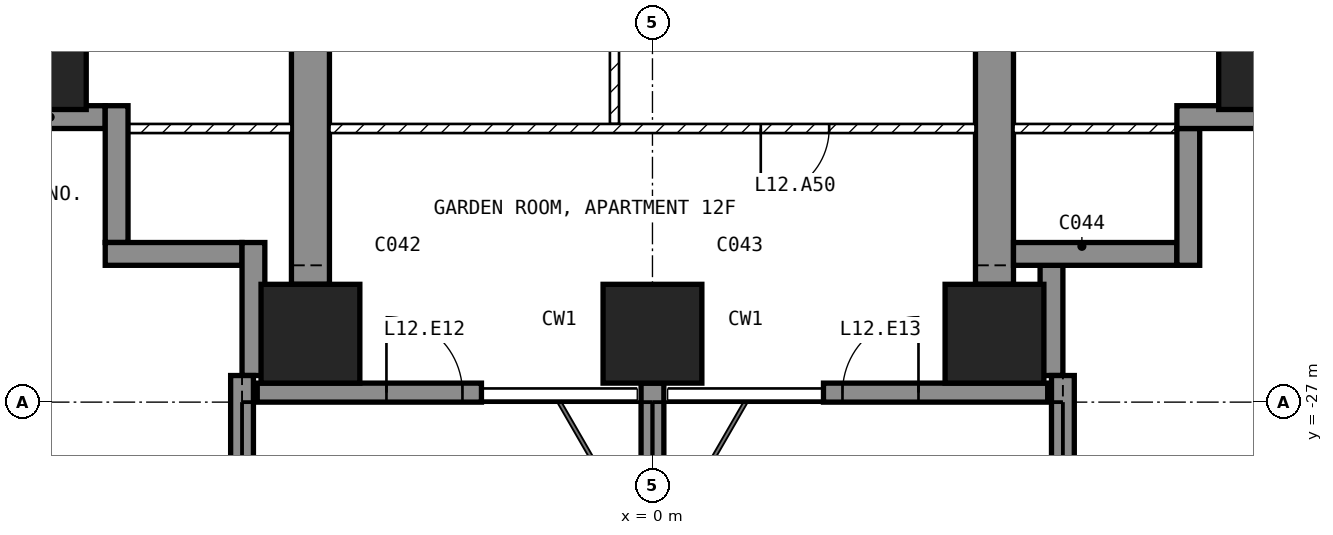
"""IFC4 building model, lengths in metres.
Left out: names, types, materials, properties, quantities, classifications, styles, units other than length and angle.
Written with IfcOpenShell. Run it as: python <this file> out.ifc"""

import sys

from ifc_helpers import new_model, si_unit, direction, frame, frame_2d, origin, origin_2d, place, context, subcontext, project, spatial, polyline, rectangle, outline, extrude, element, fill, save


model = new_model("IFC4")
c1 = context("Model", 3, precision=1e-05, world=origin(), true_north=direction((0.0, 1.0)))
c2 = subcontext(c1, "Body", "Model", "MODEL_VIEW")
j1 = project(units=[si_unit("LENGTHUNIT", "METRE"), si_unit("PLANEANGLEUNIT", "RADIAN")], contexts=[c1])
p1 = place(None, origin())
s1 = spatial("IfcSite", under=j1, at=p1, CompositionType="ELEMENT")
p2 = place(p1, origin())
s2 = spatial("IfcBuilding", under=s1, at=p2, CompositionType="ELEMENT")
p3 = place(p2, frame((0.0, 0.0, 61.0)))
s3 = spatial("IfcBuildingStorey", under=s2, at=p3, CompositionType="ELEMENT", Elevation=61.0)
for number, where, z_axis, x_axis in (
    (1, (-8.1, -22.5, -0.25), (0.0, 0.0, 1.0), (1.0, 0.0, 0.0)),
    (2, (-4.5, -26.1, -0.25), (0.0, 0.0, 1.0), (1.0, 0.0, 0.0)),
    (3, (0.0, -26.1, -0.25), (0.0, 0.0, 1.0), (1.0, 0.0, 0.0)),
    (4, (4.5, -26.1, -0.25), (0.0, 0.0, 1.0), (1.0, 0.0, 0.0)),
    (5, (8.1, -22.5, -0.25), (0.0, 0.0, 1.0), (1.0, 0.0, 0.0)),
):
    element("IfcColumn", number, at=place(p3, frame(where, z_axis=z_axis, x_axis=x_axis)), inside=s3, PredefinedType="COLUMN", context=c2, shape_type="SweptSolid", body=[
        extrude(rectangle(XDim=1.3, YDim=1.3, at=origin_2d()), origin(), (0.0, 0.0, 1.0), 3.5),
    ])
for number, where, z_axis, x_axis in (
    (6, (-4.75, -25.45, -0.25), (1.0, 0.0, 0.0), (0.0, 1.0, 0.0)),
    (7, (4.25, -25.45, -0.25), (1.0, 0.0, 0.0), (0.0, 1.0, 0.0)),
):
    element("IfcWall", number, at=place(p3, frame(where, z_axis=z_axis, x_axis=x_axis)), inside=s3, PredefinedType="SHEAR", context=c2, shape_type="SweptSolid", body=[
        extrude(outline(polyline([(0.0, 0.0), (4.15, 0.0), (4.15, 2.65), (6.55, 2.65), (6.55, 0.0), (11.95, 0.0), (11.95, 2.65), (14.35, 2.65), (14.35, 0.0), (16.45, 0.0), (16.45, 3.5), (0.0, 3.5), (0.0, 0.0)])), origin(), (0.0, 0.0, 1.0), 0.5),
    ])
p4 = place(p3, frame((-5.2, -26.875, 0.0), z_axis=(0.0, 0.0, 1.0), x_axis=(1.0, 0.0, 0.0)))
e8 = element("IfcWall", 8, at=p4, inside=s3, PredefinedType="SOLIDWALL", context=c2, shape_type="SweptSolid", body=[
    extrude(rectangle(XDim=2.95, YDim=0.25, at=frame_2d((1.475, 0.0))), origin(), (0.0, 0.0, 1.0), 3.25),
])
p5 = place(p4, frame((1.7, 0.0, 0.0)))
e9 = element("IfcOpeningElement", 9, at=p5, cuts=e8, PredefinedType="OPENING", context=c2, shape_type="SweptSolid", body=[
    extrude(rectangle(XDim=1.0, YDim=2.4, at=frame_2d((0.5, 1.2))), frame((0.0, 0.135, 0.0), z_axis=(0.0, -1.0, 0.0), x_axis=(1.0, 0.0, 0.0)), (0.0, 0.0, 1.0), 0.27),
])
p6 = place(p3, frame((2.25, -26.875, 0.0), z_axis=(0.0, 0.0, 1.0), x_axis=(1.0, 0.0, 0.0)))
e10 = element("IfcWall", 10, at=p6, inside=s3, PredefinedType="SOLIDWALL", context=c2, shape_type="SweptSolid", body=[
    extrude(rectangle(XDim=2.95, YDim=0.25, at=frame_2d((1.475, 0.0))), origin(), (0.0, 0.0, 1.0), 3.25),
])
p7 = place(p6, frame((0.25, 0.0, 0.0)))
e11 = element("IfcOpeningElement", 11, at=p7, cuts=e10, PredefinedType="OPENING", context=c2, shape_type="SweptSolid", body=[
    extrude(rectangle(XDim=1.0, YDim=2.4, at=frame_2d((0.5, 1.2))), frame((0.0, 0.135, 0.0), z_axis=(0.0, -1.0, 0.0), x_axis=(1.0, 0.0, 0.0)), (0.0, 0.0, 1.0), 0.27),
])
p8 = place(p3, frame((5.25, -26.65, 0.0), z_axis=(0.0, 0.0, 1.0), x_axis=(0.0, 1.0, 0.0)))
e12 = element("IfcWall", 12, at=p8, inside=s3, PredefinedType="SOLIDWALL", context=c2, shape_type="SweptSolid", body=[
    extrude(rectangle(XDim=1.45, YDim=0.3, at=frame_2d((0.725, 0.0))), origin(), (0.0, 0.0, 1.0), 3.25),
])
p9 = place(p3, frame((4.75, -25.05, 0.0), z_axis=(0.0, 0.0, 1.0), x_axis=(1.0, 0.0, 0.0)))
e13 = element("IfcWall", 13, at=p9, inside=s3, PredefinedType="SOLIDWALL", context=c2, shape_type="SweptSolid", body=[
    extrude(rectangle(XDim=2.15, YDim=0.3, at=frame_2d((1.075, 0.0))), origin(), (0.0, 0.0, 1.0), 3.25),
])
p10 = place(p3, frame((7.05, -25.2, 0.0), z_axis=(0.0, 0.0, 1.0), x_axis=(0.0, 1.0, 0.0)))
e14 = element("IfcWall", 14, at=p10, inside=s3, PredefinedType="SOLIDWALL", context=c2, shape_type="SweptSolid", body=[
    extrude(rectangle(XDim=1.8, YDim=0.3, at=frame_2d((0.9, 0.0))), origin(), (0.0, 0.0, 1.0), 3.25),
])
p11 = place(p3, frame((6.9, -23.25, 0.0), z_axis=(0.0, 0.0, 1.0), x_axis=(1.0, 0.0, 0.0)))
e15 = element("IfcWall", 15, at=p11, inside=s3, PredefinedType="SOLIDWALL", context=c2, shape_type="SweptSolid", body=[
    extrude(rectangle(XDim=1.75, YDim=0.3, at=frame_2d((0.875, 0.0))), origin(), (0.0, 0.0, 1.0), 3.25),
])
p12 = place(p3, frame((-8.65, -23.25, 0.0), z_axis=(0.0, 0.0, 1.0), x_axis=(1.0, 0.0, 0.0)))
e16 = element("IfcWall", 16, at=p12, inside=s3, PredefinedType="SOLIDWALL", context=c2, shape_type="SweptSolid", body=[
    extrude(rectangle(XDim=1.45, YDim=0.3, at=frame_2d((0.725, 0.0))), origin(), (0.0, 0.0, 1.0), 3.25),
])
p13 = place(p3, frame((-7.05, -23.1, 0.0), z_axis=(0.0, 0.0, 1.0), x_axis=(0.0, -1.0, 0.0)))
e17 = element("IfcWall", 17, at=p13, inside=s3, PredefinedType="SOLIDWALL", context=c2, shape_type="SweptSolid", body=[
    extrude(rectangle(XDim=1.8, YDim=0.3, at=frame_2d((0.9, 0.0))), origin(), (0.0, 0.0, 1.0), 3.25),
])
p14 = place(p3, frame((-7.2, -25.05, 0.0), z_axis=(0.0, 0.0, 1.0), x_axis=(1.0, 0.0, 0.0)))
e18 = element("IfcWall", 18, at=p14, inside=s3, PredefinedType="SOLIDWALL", context=c2, shape_type="SweptSolid", body=[
    extrude(rectangle(XDim=1.8, YDim=0.3, at=frame_2d((0.9, 0.0))), origin(), (0.0, 0.0, 1.0), 3.25),
])
p15 = place(p3, frame((-5.25, -24.9, 0.0), z_axis=(0.0, 0.0, 1.0), x_axis=(0.0, -1.0, 0.0)))
e19 = element("IfcWall", 19, at=p15, inside=s3, PredefinedType="SOLIDWALL", context=c2, shape_type="SweptSolid", body=[
    extrude(rectangle(XDim=1.75, YDim=0.3, at=frame_2d((0.875, 0.0))), origin(), (0.0, 0.0, 1.0), 3.25),
])
p16 = place(p3, frame((-5.4, -26.65, 0.0), z_axis=(0.0, 0.0, 1.0), x_axis=(0.0, -1.0, 0.0)))
e20 = element("IfcWall", 20, at=p16, inside=s3, PredefinedType="SOLIDWALL", context=c2, shape_type="SweptSolid", body=[
    extrude(rectangle(XDim=3.05, YDim=0.3, at=frame_2d((1.525, 0.0))), origin(), (0.0, 0.0, 1.0), 3.25),
])
p17 = place(p3, frame((0.0, -26.75, 0.0), z_axis=(0.0, 0.0, 1.0), x_axis=(0.0, -1.0, 0.0)))
e21 = element("IfcWall", 21, at=p17, inside=s3, PredefinedType="SOLIDWALL", context=c2, shape_type="SweptSolid", body=[
    extrude(rectangle(XDim=2.95, YDim=0.3, at=frame_2d((1.475, 0.0))), origin(), (0.0, 0.0, 1.0), 3.25),
])
p18 = place(p3, frame((5.4, -26.65, 0.0), z_axis=(0.0, 0.0, 1.0), x_axis=(0.0, -1.0, 0.0)))
e22 = element("IfcWall", 22, at=p18, inside=s3, PredefinedType="SOLIDWALL", context=c2, shape_type="SweptSolid", body=[
    extrude(rectangle(XDim=3.05, YDim=0.3, at=frame_2d((1.525, 0.0))), origin(), (0.0, 0.0, 1.0), 3.25),
])
p19 = place(p3, frame((-0.5, -23.34, 0.0), z_axis=(0.0, 0.0, 1.0), x_axis=(0.0, 1.0, 0.0)))
e23 = element("IfcWall", 23, at=p19, inside=s3, PredefinedType="PARTITIONING", context=c2, shape_type="SweptSolid", body=[
    extrude(rectangle(XDim=4.38, YDim=0.12, at=frame_2d((2.19, 0.0))), origin(), (0.0, 0.0, 1.0), 3.25),
])
p20 = place(p19, frame((1.74, 0.0, 0.0)))
e24 = element("IfcOpeningElement", 24, at=p20, cuts=e23, PredefinedType="OPENING", context=c2, shape_type="SweptSolid", body=[
    extrude(rectangle(XDim=0.9, YDim=2.1, at=frame_2d((0.45, 1.05))), frame((0.0, 0.07, 0.0), z_axis=(0.0, -1.0, 0.0), x_axis=(1.0, 0.0, 0.0)), (0.0, 0.0, 1.0), 0.14),
])
p21 = place(p3, frame((4.25, -23.4, 0.0), z_axis=(0.0, 0.0, 1.0), x_axis=(-1.0, 0.0, 0.0)))
e25 = element("IfcWall", 25, at=p21, inside=s3, PredefinedType="PARTITIONING", context=c2, shape_type="SweptSolid", body=[
    extrude(rectangle(XDim=8.5, YDim=0.12, at=frame_2d((4.25, 0.0))), origin(), (0.0, 0.0, 1.0), 3.25),
])
p22 = place(p21, frame((1.925, 0.0, 0.0)))
e26 = element("IfcOpeningElement", 26, at=p22, cuts=e25, PredefinedType="OPENING", context=c2, shape_type="SweptSolid", body=[
    extrude(rectangle(XDim=0.9, YDim=2.1, at=frame_2d((0.45, 1.05))), frame((0.0, 0.07, 0.0), z_axis=(0.0, -1.0, 0.0), x_axis=(1.0, 0.0, 0.0)), (0.0, 0.0, 1.0), 0.14),
])
for number, where, z_axis, x_axis in (
    (27, (7.12, -23.4, 0.0), (0.0, 0.0, 1.0), (-1.0, 0.0, 0.0)),
    (28, (-4.75, -23.4, 0.0), (0.0, 0.0, 1.0), (-1.0, 0.0, 0.0)),
):
    element("IfcWall", number, at=place(p3, frame(where, z_axis=z_axis, x_axis=x_axis)), inside=s3, PredefinedType="PARTITIONING", context=c2, shape_type="SweptSolid", body=[
        extrude(rectangle(XDim=2.37, YDim=0.12, at=frame_2d((1.185, 0.0))), origin(), (0.0, 0.0, 1.0), 3.25),
    ])
p23 = place(p5, origin())
e29 = element("IfcDoor", 29, at=p23, inside=s3, OperationType="SINGLE_SWING_LEFT", PredefinedType="DOOR", context=c2, shape_type="SweptSolid", body=[
    extrude(rectangle(XDim=1.0, YDim=2.4, at=frame_2d((0.5, 1.2))), frame((0.0, 0.025, 0.0), z_axis=(0.0, -1.0, 0.0), x_axis=(1.0, 0.0, 0.0)), (0.0, 0.0, 1.0), 0.05),
])
fill(e9, e29)
p24 = place(p7, origin())
e30 = element("IfcDoor", 30, at=p24, inside=s3, OperationType="SINGLE_SWING_RIGHT", PredefinedType="DOOR", context=c2, shape_type="SweptSolid", body=[
    extrude(rectangle(XDim=1.0, YDim=2.4, at=frame_2d((0.5, 1.2))), frame((0.0, 0.025, 0.0), z_axis=(0.0, -1.0, 0.0), x_axis=(1.0, 0.0, 0.0)), (0.0, 0.0, 1.0), 0.05),
])
fill(e11, e30)
p25 = place(p22, origin())
e31 = element("IfcDoor", 31, at=p25, inside=s3, OperationType="SINGLE_SWING_RIGHT", PredefinedType="DOOR", context=c2, shape_type="SweptSolid", body=[
    extrude(rectangle(XDim=0.9, YDim=2.1, at=frame_2d((0.45, 1.05))), frame((0.0, 0.025, 0.0), z_axis=(0.0, -1.0, 0.0), x_axis=(1.0, 0.0, 0.0)), (0.0, 0.0, 1.0), 0.05),
])
fill(e26, e31)
save(model, sys.argv[1])
